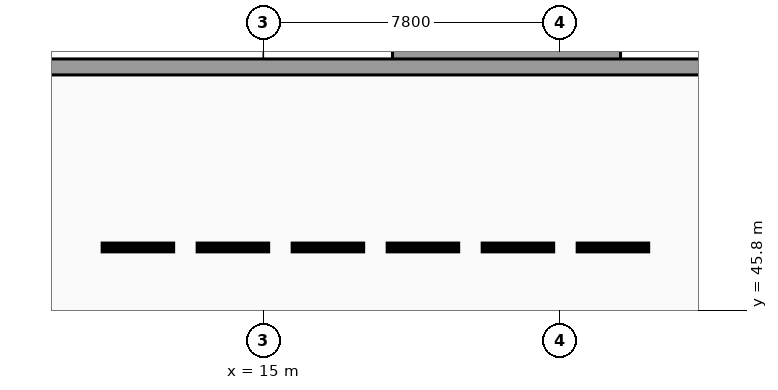
"""IFC4 building model, lengths in metres.
Left out: names, types, materials, properties, quantities, classifications, styles, units other than length and angle.
Written with IfcOpenShell. Run it as: python <this file> out.ifc"""

import sys

from ifc_helpers import new_model, si_unit, direction, frame, frame_2d, origin, place, context, subcontext, project, spatial, rectangle, extrude, element, save


model = new_model("IFC4")
c1 = context("Model", 3, precision=1e-05, world=origin(), true_north=direction((0.0, 1.0)))
c2 = subcontext(c1, "Body", "Model", "MODEL_VIEW")
j1 = project(units=[si_unit("LENGTHUNIT", "METRE"), si_unit("PLANEANGLEUNIT", "RADIAN")], contexts=[c1])
p1 = place(None, origin())
s1 = spatial("IfcSite", under=j1, at=p1, CompositionType="ELEMENT")
p2 = place(p1, origin())
s2 = spatial("IfcBuilding", under=s1, at=p2, CompositionType="ELEMENT")
p3 = place(p2, frame((0.0, 0.0, -4.08)))
s3 = spatial("IfcBuildingStorey", under=s2, at=p3, CompositionType="ELEMENT", Elevation=-4.08)
p4 = place(p3, frame((18.4, 52.55, 0.0), z_axis=(0.0, 0.0, 1.0), x_axis=(1.0, 0.0, 0.0)))
e1 = element("IfcWall", 1, at=p4, inside=s3, PredefinedType="SOLIDWALL", context=c2, shape_type="SweptSolid", body=[
    extrude(rectangle(XDim=6.0, YDim=0.42, at=frame_2d((3.0, 0.0))), origin(), (0.0, 0.0, 1.0), 3.68),
])
p5 = place(p3, frame((1.7, 52.2, 0.0), z_axis=(0.0, 0.0, 1.0), x_axis=(1.0, 0.0, 0.0)))
e2 = element("IfcWall", 2, at=p5, inside=s3, PredefinedType="SOLIDWALL", context=c2, shape_type="SweptSolid", body=[
    extrude(rectangle(XDim=73.4, YDim=0.42, at=frame_2d((36.7, 0.0))), origin(), (0.0, 0.0, 1.0), 3.76),
])
save(model, sys.argv[1])
